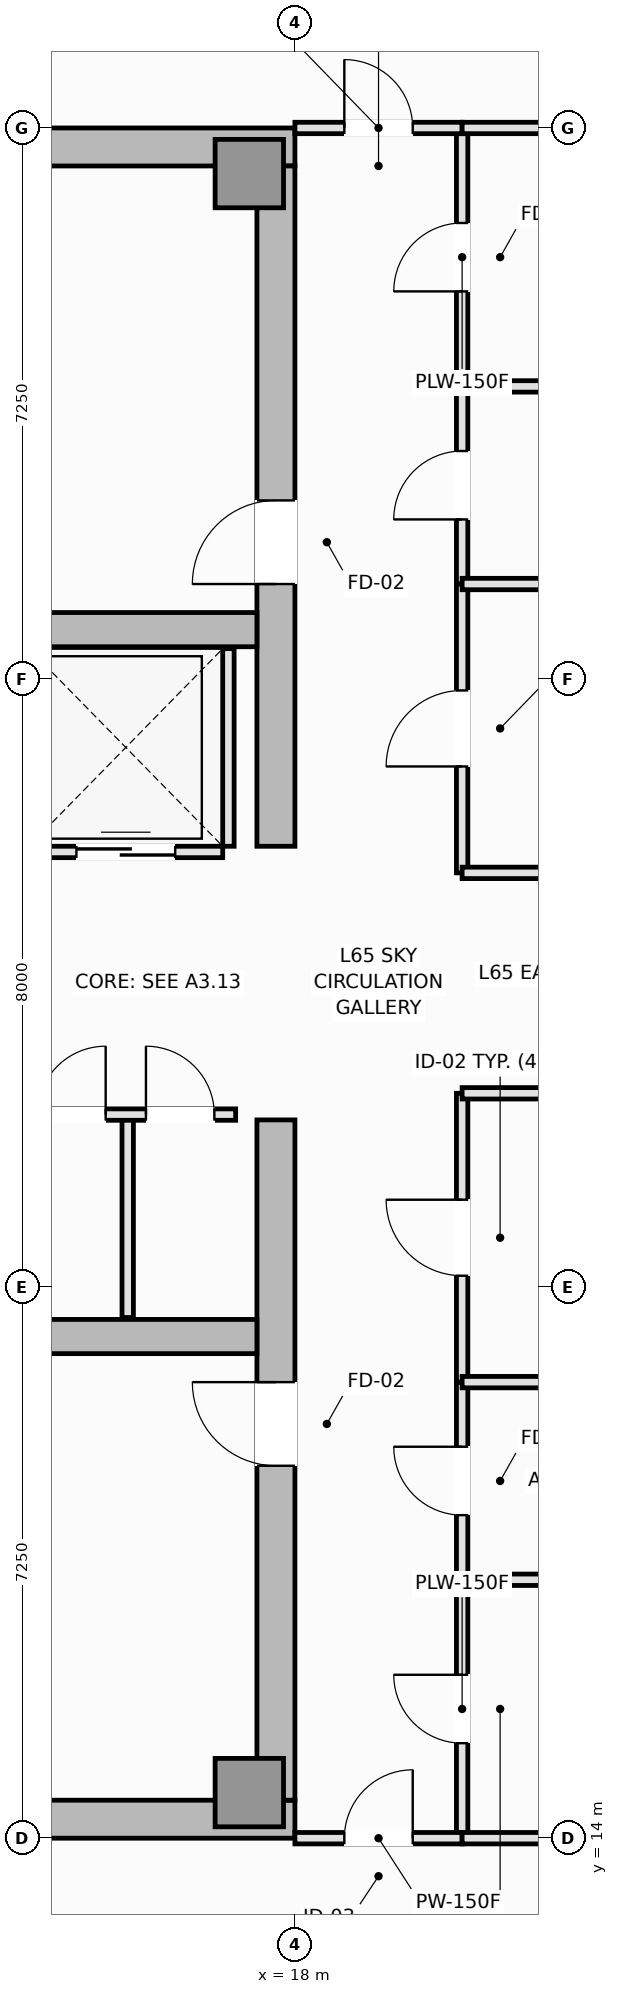
"""IFC4 building model, lengths in metres.
Left out: names, types, materials, properties, quantities, classifications, styles, units other than length and angle.
Written with IfcOpenShell. Run it as: python <this file> out.ifc"""

import sys

from ifc_helpers import new_model, si_unit, direction, frame, frame_2d, origin, origin_2d, place, context, subcontext, project, spatial, rectangle, extrude, element, fill, save


model = new_model("IFC4")
c1 = context("Model", 3, precision=1e-05, world=origin(), true_north=direction((0.0, 1.0)))
c2 = subcontext(c1, "Body", "Model", "MODEL_VIEW")
j1 = project(units=[si_unit("LENGTHUNIT", "METRE"), si_unit("PLANEANGLEUNIT", "RADIAN")], contexts=[c1])
p1 = place(None, origin())
s1 = spatial("IfcSite", under=j1, at=p1, CompositionType="ELEMENT")
p2 = place(p1, origin())
s2 = spatial("IfcBuilding", under=s1, at=p2, CompositionType="ELEMENT")
p3 = place(p2, frame((0.0, 0.0, 244.85)))
s3 = spatial("IfcBuildingStorey", under=s2, at=p3, CompositionType="ELEMENT", Elevation=244.85)
for number, where, z_axis, x_axis in (
    (1, (4.5, 14.25, 0.0), (0.0, 0.0, 1.0), (1.0, 0.0, 0.0)),
    (2, (4.5, 36.25, 0.0), (0.0, 0.0, 1.0), (1.0, 0.0, 0.0)),
):
    element("IfcWall", number, at=place(p3, frame(where, z_axis=z_axis, x_axis=x_axis)), inside=s3, PredefinedType="SHEAR", context=c2, shape_type="SweptSolid", body=[
        extrude(rectangle(XDim=13.5, YDim=0.5, at=frame_2d((6.75, 0.0))), origin(), (0.0, 0.0, 1.0), 4.4),
    ])
p4 = place(p3, frame((17.75, 14.5, 0.0), z_axis=(0.0, 0.0, 1.0), x_axis=(0.0, 1.0, 0.0)))
e3 = element("IfcWall", 3, at=p4, inside=s3, PredefinedType="SHEAR", context=c2, shape_type="SweptSolid", body=[
    extrude(rectangle(XDim=8.95, YDim=0.5, at=frame_2d((4.475, 0.0))), origin(), (0.0, 0.0, 1.0), 4.4),
])
p5 = place(p4, frame((4.4, 0.0, 0.0)))
e4 = element("IfcOpeningElement", 4, at=p5, cuts=e3, PredefinedType="OPENING", context=c2, shape_type="SweptSolid", body=[
    extrude(rectangle(XDim=1.1, YDim=2.15, at=frame_2d((0.55, 1.075))), frame((0.0, 0.26, 0.0), z_axis=(0.0, -1.0, 0.0), x_axis=(1.0, 0.0, 0.0)), (0.0, 0.0, 1.0), 0.52),
])
p6 = place(p3, frame((17.75, 27.05, 0.0), z_axis=(0.0, 0.0, 1.0), x_axis=(0.0, 1.0, 0.0)))
e5 = element("IfcWall", 5, at=p6, inside=s3, PredefinedType="SHEAR", context=c2, shape_type="SweptSolid", body=[
    extrude(rectangle(XDim=8.95, YDim=0.5, at=frame_2d((4.475, 0.0))), origin(), (0.0, 0.0, 1.0), 4.4),
])
p7 = place(p6, frame((3.45, 0.0, 0.0)))
e6 = element("IfcOpeningElement", 6, at=p7, cuts=e5, PredefinedType="OPENING", context=c2, shape_type="SweptSolid", body=[
    extrude(rectangle(XDim=1.1, YDim=2.15, at=frame_2d((0.55, 1.075))), frame((0.0, 0.26, 0.0), z_axis=(0.0, -1.0, 0.0), x_axis=(1.0, 0.0, 0.0)), (0.0, 0.0, 1.0), 0.52),
])
for number, where, z_axis, x_axis in (
    (7, (5.0, 20.6, 0.0), (0.0, 0.0, 1.0), (1.0, 0.0, 0.0)),
    (8, (5.0, 29.9, 0.0), (0.0, 0.0, 1.0), (1.0, 0.0, 0.0)),
):
    element("IfcWall", number, at=place(p3, frame(where, z_axis=z_axis, x_axis=x_axis)), inside=s3, PredefinedType="SHEAR", context=c2, shape_type="SweptSolid", body=[
        extrude(rectangle(XDim=12.5, YDim=0.45, at=frame_2d((6.25, 0.0))), origin(), (0.0, 0.0, 1.0), 4.4),
    ])
for number, where, z_axis, x_axis in (
    (9, (17.4, 14.6, 0.0), (0.0, 0.0, 1.0), (1.0, 0.0, 0.0)),
    (10, (17.4, 35.9, 0.0), (0.0, 0.0, 1.0), (1.0, 0.0, 0.0)),
):
    element("IfcColumn", number, at=place(p3, frame(where, z_axis=z_axis, x_axis=x_axis)), inside=s3, PredefinedType="PILASTER", context=c2, shape_type="SweptSolid", body=[
        extrude(rectangle(XDim=0.9, YDim=0.9, at=origin_2d()), origin(), (0.0, 0.0, 1.0), 4.4),
    ])
p8 = place(p3, frame((14.5, 26.975, 0.0), z_axis=(0.0, 0.0, 1.0), x_axis=(1.0, 0.0, 0.0)))
e11 = element("IfcWall", 11, at=p8, inside=s3, PredefinedType="PARTITIONING", context=c2, shape_type="SweptSolid", body=[
    extrude(rectangle(XDim=2.55, YDim=0.15, at=frame_2d((1.275, 0.0))), origin(), (0.0, 0.0, 1.0), 4.24),
])
p9 = place(p8, frame((0.625, 0.0, 0.0)))
e12 = element("IfcOpeningElement", 12, at=p9, cuts=e11, PredefinedType="OPENING", context=c2, shape_type="SweptSolid", body=[
    extrude(rectangle(XDim=1.3, YDim=2.2, at=frame_2d((0.65, 1.1))), frame((0.0, 0.085, 0.0), z_axis=(0.0, -1.0, 0.0), x_axis=(1.0, 0.0, 0.0)), (0.0, 0.0, 1.0), 0.17),
])
p10 = place(p3, frame((17.125, 27.05, 0.0), z_axis=(0.0, 0.0, 1.0), x_axis=(0.0, 1.0, 0.0)))
e13 = element("IfcWall", 13, at=p10, inside=s3, PredefinedType="PARTITIONING", context=c2, shape_type="SweptSolid", body=[
    extrude(rectangle(XDim=2.6, YDim=0.15, at=frame_2d((1.3, 0.0))), origin(), (0.0, 0.0, 1.0), 4.24),
])
p11 = place(p3, frame((15.8, 20.85, 0.0), z_axis=(0.0, 0.0, 1.0), x_axis=(0.0, 1.0, 0.0)))
e14 = element("IfcWall", 14, at=p11, inside=s3, PredefinedType="PARTITIONING", context=c2, shape_type="SweptSolid", body=[
    extrude(rectangle(XDim=2.67, YDim=0.15, at=frame_2d((1.335, 0.0))), origin(), (0.0, 0.0, 1.0), 4.24),
])
p12 = place(p3, frame((14.33, 23.52, 0.0), z_axis=(0.0, 0.0, 1.0), x_axis=(1.0, 0.0, 0.0)))
e15 = element("IfcWall", 15, at=p12, inside=s3, PredefinedType="PARTITIONING", context=c2, shape_type="SweptSolid", body=[
    extrude(rectangle(XDim=2.89, YDim=0.15, at=frame_2d((1.445, 0.0))), origin(), (0.0, 0.0, 1.0), 4.24),
])
p13 = place(p12, frame((0.28, 0.0, 0.0)))
e16 = element("IfcOpeningElement", 16, at=p13, cuts=e15, PredefinedType="OPENING", context=c2, shape_type="SweptSolid", body=[
    extrude(rectangle(XDim=0.9, YDim=2.1, at=frame_2d((0.45, 1.05))), frame((0.0, 0.085, 0.0), z_axis=(0.0, -1.0, 0.0), x_axis=(1.0, 0.0, 0.0)), (0.0, 0.0, 1.0), 0.17),
])
p14 = place(p12, frame((1.71, 0.0, 0.0)))
e17 = element("IfcOpeningElement", 17, at=p14, cuts=e15, PredefinedType="OPENING", context=c2, shape_type="SweptSolid", body=[
    extrude(rectangle(XDim=0.9, YDim=2.1, at=frame_2d((0.45, 1.05))), frame((0.0, 0.085, 0.0), z_axis=(0.0, -1.0, 0.0), x_axis=(1.0, 0.0, 0.0)), (0.0, 0.0, 1.0), 0.17),
])
p15 = place(p3, frame((20.2, 14.0, 0.0), z_axis=(0.0, 0.0, 1.0), x_axis=(0.0, 1.0, 0.0)))
e18 = element("IfcWall", 18, at=p15, inside=s3, PredefinedType="PLUMBINGWALL", context=c2, shape_type="SweptSolid", body=[
    extrude(rectangle(XDim=3.4, YDim=0.15, at=frame_2d((1.7, 0.0))), origin(), (0.0, 0.0, 1.0), 4.24),
])
p16 = place(p15, frame((1.25, 0.0, 0.0)))
e19 = element("IfcOpeningElement", 19, at=p16, cuts=e18, PredefinedType="OPENING", context=c2, shape_type="SweptSolid", body=[
    extrude(rectangle(XDim=0.9, YDim=2.1, at=frame_2d((0.45, 1.05))), frame((0.0, 0.085, 0.0), z_axis=(0.0, -1.0, 0.0), x_axis=(1.0, 0.0, 0.0)), (0.0, 0.0, 1.0), 0.17),
])
p17 = place(p3, frame((20.2, 33.1, 0.0), z_axis=(0.0, 0.0, 1.0), x_axis=(0.0, 1.0, 0.0)))
e20 = element("IfcWall", 20, at=p17, inside=s3, PredefinedType="PLUMBINGWALL", context=c2, shape_type="SweptSolid", body=[
    extrude(rectangle(XDim=3.4, YDim=0.15, at=frame_2d((1.7, 0.0))), origin(), (0.0, 0.0, 1.0), 4.24),
])
p18 = place(p17, frame((1.25, 0.0, 0.0)))
e21 = element("IfcOpeningElement", 21, at=p18, cuts=e20, PredefinedType="OPENING", context=c2, shape_type="SweptSolid", body=[
    extrude(rectangle(XDim=0.9, YDim=2.1, at=frame_2d((0.45, 1.05))), frame((0.0, 0.085, 0.0), z_axis=(0.0, -1.0, 0.0), x_axis=(1.0, 0.0, 0.0)), (0.0, 0.0, 1.0), 0.17),
])
p19 = place(p3, frame((20.2, 17.4, 0.0), z_axis=(0.0, 0.0, 1.0), x_axis=(0.0, 1.0, 0.0)))
e22 = element("IfcWall", 22, at=p19, inside=s3, PredefinedType="PLUMBINGWALL", context=c2, shape_type="SweptSolid", body=[
    extrude(rectangle(XDim=2.6, YDim=0.15, at=frame_2d((1.3, 0.0))), origin(), (0.0, 0.0, 1.0), 4.24),
])
p20 = place(p19, frame((0.85, 0.0, 0.0)))
e23 = element("IfcOpeningElement", 23, at=p20, cuts=e22, PredefinedType="OPENING", context=c2, shape_type="SweptSolid", body=[
    extrude(rectangle(XDim=0.9, YDim=2.1, at=frame_2d((0.45, 1.05))), frame((0.0, 0.085, 0.0), z_axis=(0.0, -1.0, 0.0), x_axis=(1.0, 0.0, 0.0)), (0.0, 0.0, 1.0), 0.17),
])
p21 = place(p3, frame((20.2, 30.5, 0.0), z_axis=(0.0, 0.0, 1.0), x_axis=(0.0, 1.0, 0.0)))
e24 = element("IfcWall", 24, at=p21, inside=s3, PredefinedType="PLUMBINGWALL", context=c2, shape_type="SweptSolid", body=[
    extrude(rectangle(XDim=2.6, YDim=0.15, at=frame_2d((1.3, 0.0))), origin(), (0.0, 0.0, 1.0), 4.24),
])
p22 = place(p21, frame((0.85, 0.0, 0.0)))
e25 = element("IfcOpeningElement", 25, at=p22, cuts=e24, PredefinedType="OPENING", context=c2, shape_type="SweptSolid", body=[
    extrude(rectangle(XDim=0.9, YDim=2.1, at=frame_2d((0.45, 1.05))), frame((0.0, 0.085, 0.0), z_axis=(0.0, -1.0, 0.0), x_axis=(1.0, 0.0, 0.0)), (0.0, 0.0, 1.0), 0.17),
])
p23 = place(p3, frame((18.0, 14.0, 0.0), z_axis=(0.0, 0.0, 1.0), x_axis=(1.0, 0.0, 0.0)))
e26 = element("IfcWall", 26, at=p23, inside=s3, PredefinedType="PARTITIONING", context=c2, shape_type="SweptSolid", body=[
    extrude(rectangle(XDim=2.2, YDim=0.15, at=frame_2d((1.1, 0.0))), origin(), (0.0, 0.0, 1.0), 4.24),
])
p24 = place(p23, frame((0.65, 0.0, 0.0)))
e27 = element("IfcOpeningElement", 27, at=p24, cuts=e26, PredefinedType="OPENING", context=c2, shape_type="SweptSolid", body=[
    extrude(rectangle(XDim=0.9, YDim=2.1, at=frame_2d((0.45, 1.05))), frame((0.0, 0.085, 0.0), z_axis=(0.0, -1.0, 0.0), x_axis=(1.0, 0.0, 0.0)), (0.0, 0.0, 1.0), 0.17),
])
p25 = place(p3, frame((18.0, 36.5, 0.0), z_axis=(0.0, 0.0, 1.0), x_axis=(1.0, 0.0, 0.0)))
e28 = element("IfcWall", 28, at=p25, inside=s3, PredefinedType="PARTITIONING", context=c2, shape_type="SweptSolid", body=[
    extrude(rectangle(XDim=2.2, YDim=0.15, at=frame_2d((1.1, 0.0))), origin(), (0.0, 0.0, 1.0), 4.24),
])
p26 = place(p25, frame((0.65, 0.0, 0.0)))
e29 = element("IfcOpeningElement", 29, at=p26, cuts=e28, PredefinedType="OPENING", context=c2, shape_type="SweptSolid", body=[
    extrude(rectangle(XDim=0.9, YDim=2.1, at=frame_2d((0.45, 1.05))), frame((0.0, 0.085, 0.0), z_axis=(0.0, -1.0, 0.0), x_axis=(1.0, 0.0, 0.0)), (0.0, 0.0, 1.0), 0.17),
])
p27 = place(p3, frame((20.2, 20.0, 0.0), z_axis=(0.0, 0.0, 1.0), x_axis=(0.0, 1.0, 0.0)))
e30 = element("IfcWall", 30, at=p27, inside=s3, PredefinedType="PARTITIONING", context=c2, shape_type="SweptSolid", body=[
    extrude(rectangle(XDim=3.8, YDim=0.15, at=frame_2d((1.9, 0.0))), origin(), (0.0, 0.0, 1.0), 4.24),
])
p28 = place(p27, frame((1.4, 0.0, 0.0)))
e31 = element("IfcOpeningElement", 31, at=p28, cuts=e30, PredefinedType="OPENING", context=c2, shape_type="SweptSolid", body=[
    extrude(rectangle(XDim=1.0, YDim=2.15, at=frame_2d((0.5, 1.075))), frame((0.0, 0.085, 0.0), z_axis=(0.0, -1.0, 0.0), x_axis=(1.0, 0.0, 0.0)), (0.0, 0.0, 1.0), 0.17),
])
p29 = place(p3, frame((20.2, 26.7, 0.0), z_axis=(0.0, 0.0, 1.0), x_axis=(0.0, 1.0, 0.0)))
e32 = element("IfcWall", 32, at=p29, inside=s3, PredefinedType="PARTITIONING", context=c2, shape_type="SweptSolid", body=[
    extrude(rectangle(XDim=3.8, YDim=0.15, at=frame_2d((1.9, 0.0))), origin(), (0.0, 0.0, 1.0), 4.24),
])
p30 = place(p29, frame((1.4, 0.0, 0.0)))
e33 = element("IfcOpeningElement", 33, at=p30, cuts=e32, PredefinedType="OPENING", context=c2, shape_type="SweptSolid", body=[
    extrude(rectangle(XDim=1.0, YDim=2.15, at=frame_2d((0.5, 1.075))), frame((0.0, 0.085, 0.0), z_axis=(0.0, -1.0, 0.0), x_axis=(1.0, 0.0, 0.0)), (0.0, 0.0, 1.0), 0.17),
])
for number, where, z_axis, x_axis in (
    (34, (20.2, 23.8, 0.0), (0.0, 0.0, 1.0), (1.0, 0.0, 0.0)),
    (35, (20.2, 26.7, 0.0), (0.0, 0.0, 1.0), (1.0, 0.0, 0.0)),
):
    element("IfcWall", number, at=place(p3, frame(where, z_axis=z_axis, x_axis=x_axis)), inside=s3, PredefinedType="PARTITIONING", context=c2, shape_type="SweptSolid", body=[
        extrude(rectangle(XDim=3.8, YDim=0.15, at=frame_2d((1.9, 0.0))), origin(), (0.0, 0.0, 1.0), 4.24),
    ])
for number, where, z_axis, x_axis in (
    (36, (20.2, 17.4, 0.0), (0.0, 0.0, 1.0), (1.0, 0.0, 0.0)),
    (37, (20.2, 14.0, 0.0), (0.0, 0.0, 1.0), (1.0, 0.0, 0.0)),
    (38, (20.2, 33.1, 0.0), (0.0, 0.0, 1.0), (1.0, 0.0, 0.0)),
    (39, (20.2, 36.5, 0.0), (0.0, 0.0, 1.0), (1.0, 0.0, 0.0)),
    (40, (20.2, 20.0, 0.0), (0.0, 0.0, 1.0), (1.0, 0.0, 0.0)),
    (41, (20.2, 30.5, 0.0), (0.0, 0.0, 1.0), (1.0, 0.0, 0.0)),
):
    element("IfcWall", number, at=place(p3, frame(where, z_axis=z_axis, x_axis=x_axis)), inside=s3, PredefinedType="PLUMBINGWALL", context=c2, shape_type="SweptSolid", body=[
        extrude(rectangle(XDim=3.8, YDim=0.15, at=frame_2d((1.9, 0.0))), origin(), (0.0, 0.0, 1.0), 4.24),
    ])
p31 = place(p9, origin())
e42 = element("IfcDoor", 42, at=p31, inside=s3, OperationType="DOUBLE_DOOR_SLIDING", PredefinedType="DOOR", context=c2, shape_type="SweptSolid", body=[
    extrude(rectangle(XDim=1.3, YDim=2.2, at=frame_2d((0.65, 1.1))), frame((0.0, 0.025, 0.0), z_axis=(0.0, -1.0, 0.0), x_axis=(1.0, 0.0, 0.0)), (0.0, 0.0, 1.0), 0.05),
])
fill(e12, e42)
p32 = place(p5, origin())
e43 = element("IfcDoor", 43, at=p32, inside=s3, OperationType="SINGLE_SWING_RIGHT", PredefinedType="DOOR", context=c2, shape_type="SweptSolid", body=[
    extrude(rectangle(XDim=1.1, YDim=2.15, at=frame_2d((0.55, 1.075))), frame((0.0, 0.025, 0.0), z_axis=(0.0, -1.0, 0.0), x_axis=(1.0, 0.0, 0.0)), (0.0, 0.0, 1.0), 0.05),
])
fill(e4, e43)
p33 = place(p7, origin())
e44 = element("IfcDoor", 44, at=p33, inside=s3, OperationType="SINGLE_SWING_LEFT", PredefinedType="DOOR", context=c2, shape_type="SweptSolid", body=[
    extrude(rectangle(XDim=1.1, YDim=2.15, at=frame_2d((0.55, 1.075))), frame((0.0, 0.025, 0.0), z_axis=(0.0, -1.0, 0.0), x_axis=(1.0, 0.0, 0.0)), (0.0, 0.0, 1.0), 0.05),
])
fill(e6, e44)
p34 = place(p13, origin())
e45 = element("IfcDoor", 45, at=p34, inside=s3, OperationType="SINGLE_SWING_RIGHT", PredefinedType="DOOR", context=c2, shape_type="SweptSolid", body=[
    extrude(rectangle(XDim=0.9, YDim=2.1, at=frame_2d((0.45, 1.05))), frame((0.0, 0.025, 0.0), z_axis=(0.0, -1.0, 0.0), x_axis=(1.0, 0.0, 0.0)), (0.0, 0.0, 1.0), 0.05),
])
fill(e16, e45)
p35 = place(p14, origin())
e46 = element("IfcDoor", 46, at=p35, inside=s3, OperationType="SINGLE_SWING_LEFT", PredefinedType="DOOR", context=c2, shape_type="SweptSolid", body=[
    extrude(rectangle(XDim=0.9, YDim=2.1, at=frame_2d((0.45, 1.05))), frame((0.0, 0.025, 0.0), z_axis=(0.0, -1.0, 0.0), x_axis=(1.0, 0.0, 0.0)), (0.0, 0.0, 1.0), 0.05),
])
fill(e17, e46)
p36 = place(p16, origin())
e47 = element("IfcDoor", 47, at=p36, inside=s3, OperationType="SINGLE_SWING_RIGHT", PredefinedType="DOOR", context=c2, shape_type="SweptSolid", body=[
    extrude(rectangle(XDim=0.9, YDim=2.1, at=frame_2d((0.45, 1.05))), frame((0.0, 0.025, 0.0), z_axis=(0.0, -1.0, 0.0), x_axis=(1.0, 0.0, 0.0)), (0.0, 0.0, 1.0), 0.05),
])
fill(e19, e47)
p37 = place(p18, origin())
e48 = element("IfcDoor", 48, at=p37, inside=s3, OperationType="SINGLE_SWING_LEFT", PredefinedType="DOOR", context=c2, shape_type="SweptSolid", body=[
    extrude(rectangle(XDim=0.9, YDim=2.1, at=frame_2d((0.45, 1.05))), frame((0.0, 0.025, 0.0), z_axis=(0.0, -1.0, 0.0), x_axis=(1.0, 0.0, 0.0)), (0.0, 0.0, 1.0), 0.05),
])
fill(e21, e48)
p38 = place(p20, origin())
e49 = element("IfcDoor", 49, at=p38, inside=s3, OperationType="SINGLE_SWING_RIGHT", PredefinedType="DOOR", context=c2, shape_type="SweptSolid", body=[
    extrude(rectangle(XDim=0.9, YDim=2.1, at=frame_2d((0.45, 1.05))), frame((0.0, 0.025, 0.0), z_axis=(0.0, -1.0, 0.0), x_axis=(1.0, 0.0, 0.0)), (0.0, 0.0, 1.0), 0.05),
])
fill(e23, e49)
p39 = place(p22, origin())
e50 = element("IfcDoor", 50, at=p39, inside=s3, OperationType="SINGLE_SWING_LEFT", PredefinedType="DOOR", context=c2, shape_type="SweptSolid", body=[
    extrude(rectangle(XDim=0.9, YDim=2.1, at=frame_2d((0.45, 1.05))), frame((0.0, 0.025, 0.0), z_axis=(0.0, -1.0, 0.0), x_axis=(1.0, 0.0, 0.0)), (0.0, 0.0, 1.0), 0.05),
])
fill(e25, e50)
p40 = place(p24, origin())
e51 = element("IfcDoor", 51, at=p40, inside=s3, OperationType="SINGLE_SWING_RIGHT", PredefinedType="DOOR", context=c2, shape_type="SweptSolid", body=[
    extrude(rectangle(XDim=0.9, YDim=2.1, at=frame_2d((0.45, 1.05))), frame((0.0, 0.025, 0.0), z_axis=(0.0, -1.0, 0.0), x_axis=(1.0, 0.0, 0.0)), (0.0, 0.0, 1.0), 0.05),
])
fill(e27, e51)
p41 = place(p26, origin())
e52 = element("IfcDoor", 52, at=p41, inside=s3, OperationType="SINGLE_SWING_LEFT", PredefinedType="DOOR", context=c2, shape_type="SweptSolid", body=[
    extrude(rectangle(XDim=0.9, YDim=2.1, at=frame_2d((0.45, 1.05))), frame((0.0, 0.025, 0.0), z_axis=(0.0, -1.0, 0.0), x_axis=(1.0, 0.0, 0.0)), (0.0, 0.0, 1.0), 0.05),
])
fill(e29, e52)
p42 = place(p28, origin())
e53 = element("IfcDoor", 53, at=p42, inside=s3, OperationType="SINGLE_SWING_RIGHT", PredefinedType="DOOR", context=c2, shape_type="SweptSolid", body=[
    extrude(rectangle(XDim=1.0, YDim=2.15, at=frame_2d((0.5, 1.075))), frame((0.0, 0.025, 0.0), z_axis=(0.0, -1.0, 0.0), x_axis=(1.0, 0.0, 0.0)), (0.0, 0.0, 1.0), 0.05),
])
fill(e31, e53)
p43 = place(p30, origin())
e54 = element("IfcDoor", 54, at=p43, inside=s3, OperationType="SINGLE_SWING_LEFT", PredefinedType="DOOR", context=c2, shape_type="SweptSolid", body=[
    extrude(rectangle(XDim=1.0, YDim=2.15, at=frame_2d((0.5, 1.075))), frame((0.0, 0.025, 0.0), z_axis=(0.0, -1.0, 0.0), x_axis=(1.0, 0.0, 0.0)), (0.0, 0.0, 1.0), 0.05),
])
fill(e33, e54)
save(model, sys.argv[1])
